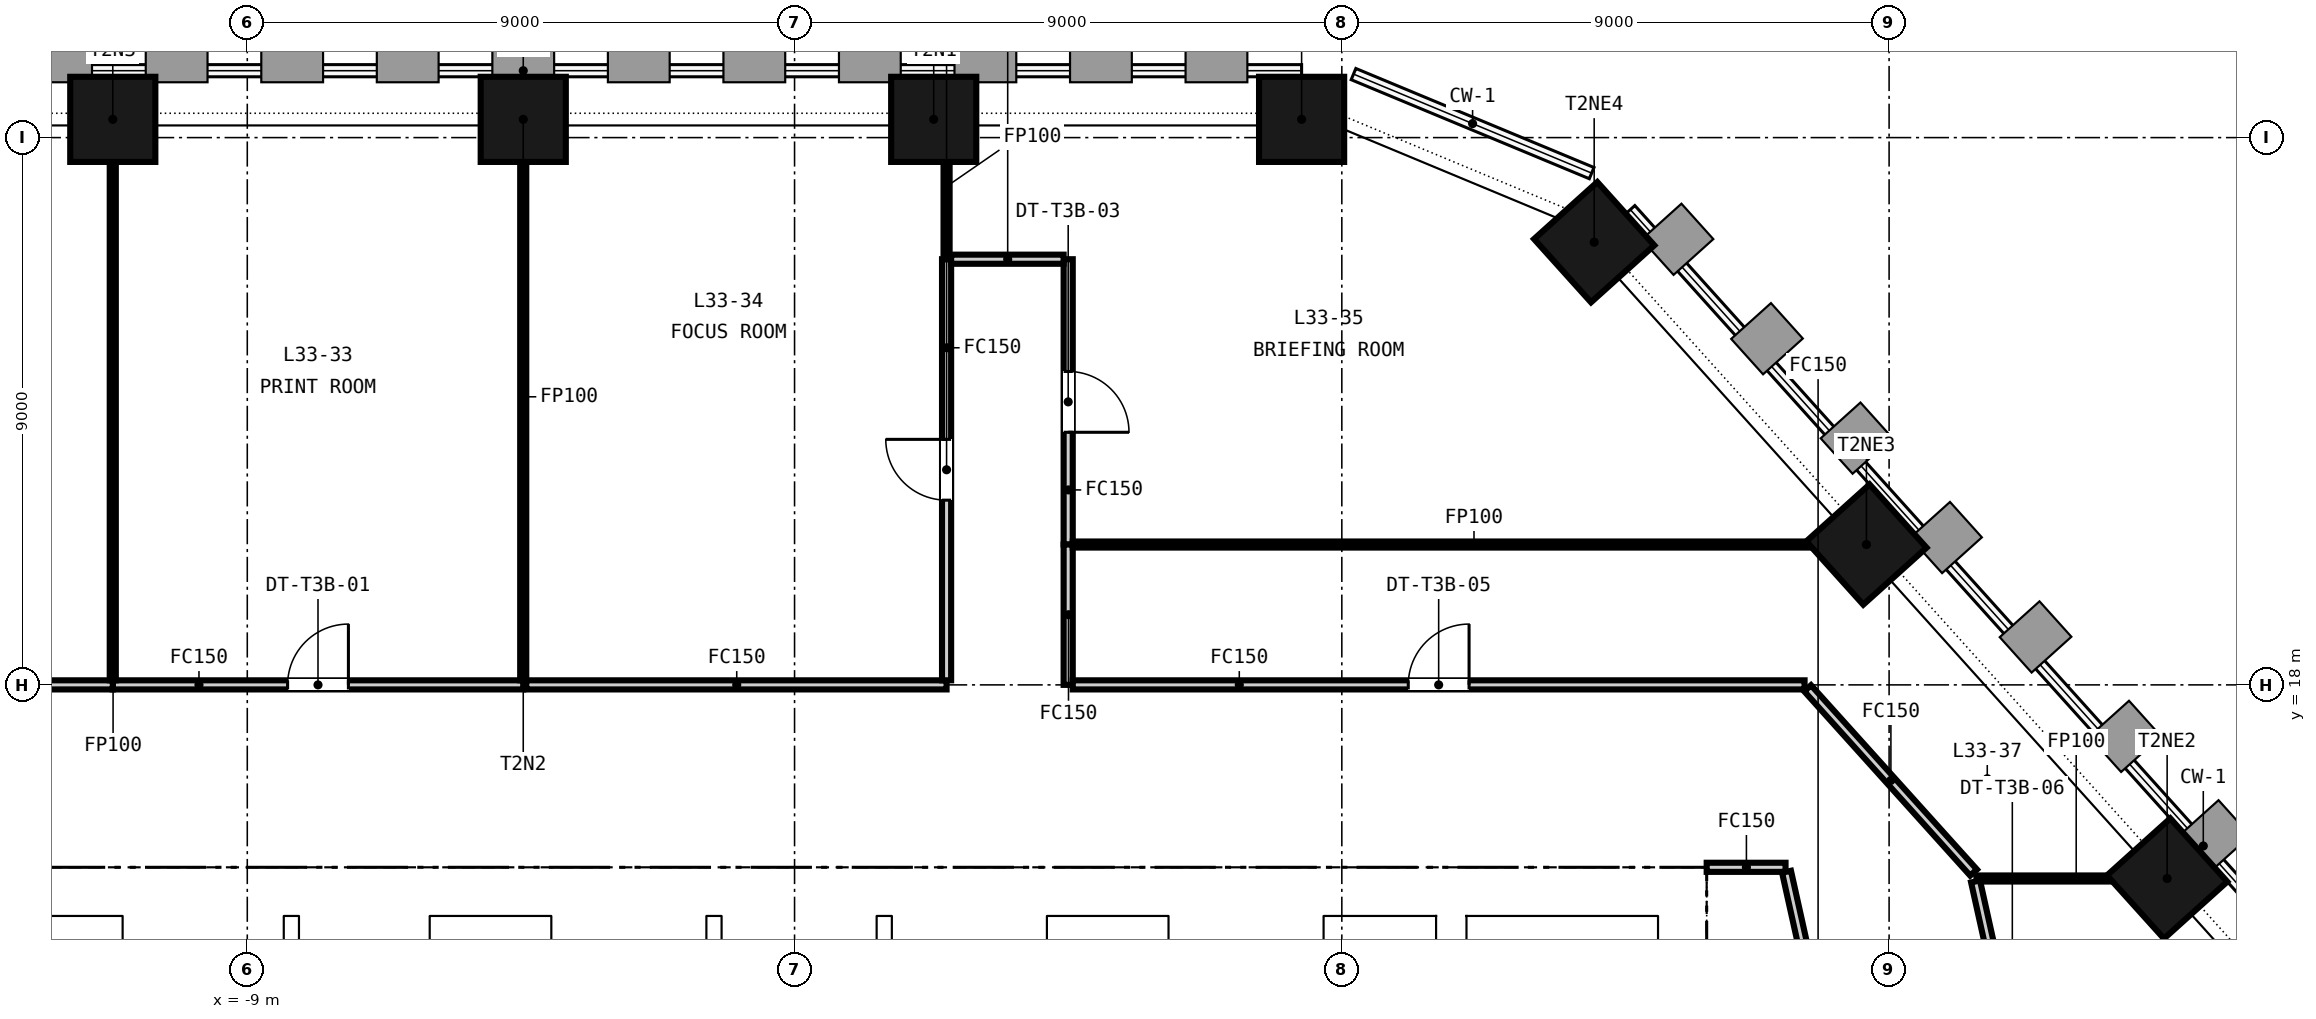
"""IFC4 building model, lengths in metres.
Left out: names, types, materials, properties, quantities, classifications, styles, units other than length and angle.
Written with IfcOpenShell. Run it as: python <this file> out.ifc"""

import sys

from ifc_helpers import new_model, si_unit, direction, frame, frame_2d, origin, origin_2d, place, context, subcontext, project, spatial, rectangle, extrude, element, fill, save


model = new_model("IFC4")
c1 = context("Model", 3, precision=1e-05, world=origin(), true_north=direction((0.0, 1.0)))
c2 = subcontext(c1, "Body", "Model", "MODEL_VIEW")
j1 = project(units=[si_unit("LENGTHUNIT", "METRE"), si_unit("PLANEANGLEUNIT", "RADIAN")], contexts=[c1])
p1 = place(None, origin())
s1 = spatial("IfcSite", under=j1, at=p1, CompositionType="ELEMENT")
p2 = place(p1, origin())
s2 = spatial("IfcBuilding", under=s1, at=p2, CompositionType="ELEMENT")
p3 = place(p2, frame((0.0, 0.0, 137.1)))
s3 = spatial("IfcBuildingStorey", under=s2, at=p3, CompositionType="ELEMENT", Elevation=137.1)
p4 = place(p3, frame((-15.0, 14.6, -0.15), z_axis=(0.0, 0.0, 1.0), x_axis=(1.0, 0.0, 0.0)))
e1 = element("IfcWall", 1, at=p4, inside=s3, PredefinedType="SOLIDWALL", context=c2, shape_type="SweptSolid", body=[
    extrude(rectangle(XDim=30.0, YDim=0.8, at=frame_2d((15.0, 0.0))), origin(), (0.0, 0.0, 1.0), 3.65),
])
p5 = place(p4, frame((9.25, 0.0, 0.15)))
e2 = element("IfcOpeningElement", 2, at=p5, cuts=e1, PredefinedType="OPENING", context=c2, shape_type="SweptSolid", body=[
    extrude(rectangle(XDim=1.5, YDim=2.1, at=frame_2d((0.75, 1.05))), frame((0.0, 0.41, 0.0), z_axis=(0.0, -1.0, 0.0), x_axis=(1.0, 0.0, 0.0)), (0.0, 0.0, 1.0), 0.82),
])
p6 = place(p4, frame((19.4, 0.0, 0.15)))
e3 = element("IfcOpeningElement", 3, at=p6, cuts=e1, PredefinedType="OPENING", context=c2, shape_type="SweptSolid", body=[
    extrude(rectangle(XDim=1.5, YDim=2.1, at=frame_2d((0.75, 1.05))), frame((0.0, 0.41, 0.0), z_axis=(0.0, -1.0, 0.0), x_axis=(1.0, 0.0, 0.0)), (0.0, 0.0, 1.0), 0.82),
])
p7 = place(p4, frame((1.5, 0.0, 0.15)))
e4 = element("IfcOpeningElement", 4, at=p7, cuts=e1, PredefinedType="OPENING", context=c2, shape_type="SweptSolid", body=[
    extrude(rectangle(XDim=1.2, YDim=2.1, at=frame_2d((0.6, 1.05))), frame((0.0, 0.41, 0.0), z_axis=(0.0, -1.0, 0.0), x_axis=(1.0, 0.0, 0.0)), (0.0, 0.0, 1.0), 0.82),
])
p8 = place(p4, frame((27.3, 0.0, 0.15)))
e5 = element("IfcOpeningElement", 5, at=p8, cuts=e1, PredefinedType="OPENING", context=c2, shape_type="SweptSolid", body=[
    extrude(rectangle(XDim=1.2, YDim=2.1, at=frame_2d((0.6, 1.05))), frame((0.0, 0.41, 0.0), z_axis=(0.0, -1.0, 0.0), x_axis=(1.0, 0.0, 0.0)), (0.0, 0.0, 1.0), 0.82),
])
p9 = place(p3, frame((14.6, 0.8, -0.15), z_axis=(0.0, 0.0, 1.0), x_axis=(0.0, 1.0, 0.0)))
e6 = element("IfcWall", 6, at=p9, inside=s3, PredefinedType="SOLIDWALL", context=c2, shape_type="SweptSolid", body=[
    extrude(rectangle(XDim=13.4, YDim=0.8, at=frame_2d((6.7, 0.0))), origin(), (0.0, 0.0, 1.0), 3.65),
])
for number, where, z_axis, x_axis in (
    (7, (-10.8, 0.8, -0.15), (0.0, 0.0, 1.0), (0.0, 1.0, 0.0)),
    (8, (10.8, 0.8, -0.15), (0.0, 0.0, 1.0), (0.0, 1.0, 0.0)),
):
    element("IfcWall", number, at=place(p3, frame(where, z_axis=z_axis, x_axis=x_axis)), inside=s3, PredefinedType="SOLIDWALL", context=c2, shape_type="SweptSolid", body=[
        extrude(rectangle(XDim=13.4, YDim=0.5, at=frame_2d((6.7, 0.0))), origin(), (0.0, 0.0, 1.0), 3.65),
    ])
for number, where, z_axis, x_axis in (
    (9, (8.339, 27.3, -0.15), (0.0, 0.0, 1.0), (-1.0, 0.0, 0.0)),
    (10, (2.288, 27.3, -0.15), (0.0, 0.0, 1.0), (-1.0, 0.0, 0.0)),
    (11, (-4.462, 27.3, -0.15), (0.0, 0.0, 1.0), (-1.0, 0.0, 0.0)),
    (12, (-11.212, 27.3, -0.15), (0.0, 0.0, 1.0), (-1.0, 0.0, 0.0)),
    (13, (22.573, 14.816, -0.15), (0.0, 0.0, 1.0), (-0.669, 0.743, 0.0)),
    (14, (17.627, 20.308, -0.15), (0.0, 0.0, 1.0), (-0.669, 0.743, 0.0)),
    (15, (13.15, 25.28, -0.15), (0.0, 0.0, 1.0), (-0.669, 0.743, 0.0)),
):
    element("IfcColumn", number, at=place(p3, frame(where, z_axis=z_axis, x_axis=x_axis)), inside=s3, PredefinedType="COLUMN", context=c2, shape_type="SweptSolid", body=[
        extrude(rectangle(XDim=1.4, YDim=1.4, at=origin_2d()), origin(), (0.0, 0.0, 1.0), 3.65),
    ])
for number, where, z_axis, x_axis in (
    (16, (-8.275, 11.3, 0.0), (0.0, 0.0, 1.0), (0.0, 1.0, 0.0)),
    (17, (-5.875, 11.3, 0.0), (0.0, 0.0, 1.0), (0.0, 1.0, 0.0)),
    (18, (-4.125, 11.3, 0.0), (0.0, 0.0, 1.0), (0.0, 1.0, 0.0)),
    (19, (-1.325, 11.3, 0.0), (0.0, 0.0, 1.0), (0.0, 1.0, 0.0)),
    (20, (1.475, 11.3, 0.0), (0.0, 0.0, 1.0), (0.0, 1.0, 0.0)),
    (21, (4.275, 11.3, 0.0), (0.0, 0.0, 1.0), (0.0, 1.0, 0.0)),
    (22, (6.025, 11.3, 0.0), (0.0, 0.0, 1.0), (0.0, 1.0, 0.0)),
    (23, (8.825, 11.3, 0.0), (0.0, 0.0, 1.0), (0.0, 1.0, 0.0)),
):
    element("IfcWall", number, at=place(p3, frame(where, z_axis=z_axis, x_axis=x_axis)), inside=s3, PredefinedType="PARTITIONING", context=c2, shape_type="SweptSolid", body=[
        extrude(rectangle(XDim=2.9, YDim=0.25, at=frame_2d((1.45, 0.0))), origin(), (0.0, 0.0, 1.0), 3.5),
    ])
p10 = place(p3, frame((14.1, 0.8, 0.0), z_axis=(0.0, 0.0, 1.0), x_axis=(0.0, 1.0, 0.0)))
e24 = element("IfcWall", 24, at=p10, inside=s3, PredefinedType="SOLIDWALL", context=c2, shape_type="SweptSolid", body=[
    extrude(rectangle(XDim=13.4, YDim=0.2, at=frame_2d((6.7, 0.0))), origin(), (0.0, 0.0, 1.0), 3.5),
])
p11 = place(p3, frame((4.5, 25.0, 0.0), z_axis=(0.0, 0.0, 1.0), x_axis=(0.0, -1.0, 0.0)))
e25 = element("IfcWall", 25, at=p11, inside=s3, PredefinedType="PARTITIONING", context=c2, shape_type="SweptSolid", body=[
    extrude(rectangle(XDim=4.692, YDim=0.15, at=frame_2d((2.346, 0.0))), origin(), (0.0, 0.0, 1.0), 2.741),
])
p12 = place(p11, frame((1.846, 0.0, 0.0)))
e26 = element("IfcOpeningElement", 26, at=p12, cuts=e25, PredefinedType="OPENING", context=c2, shape_type="SweptSolid", body=[
    extrude(rectangle(XDim=1.0, YDim=2.1, at=frame_2d((0.5, 1.05))), frame((0.0, 0.085, 0.0), z_axis=(0.0, -1.0, 0.0), x_axis=(1.0, 0.0, 0.0)), (0.0, 0.0, 1.0), 0.17),
])
p13 = place(p3, frame((4.5, 20.308, 0.0), z_axis=(0.0, 0.0, 1.0), x_axis=(0.0, -1.0, 0.0)))
e27 = element("IfcWall", 27, at=p13, inside=s3, PredefinedType="PARTITIONING", context=c2, shape_type="SweptSolid", body=[
    extrude(rectangle(XDim=2.308, YDim=0.15, at=frame_2d((1.154, 0.0))), origin(), (0.0, 0.0, 1.0), 2.741),
])
p14 = place(p3, frame((16.297, 15.0, 0.0), z_axis=(0.0, 0.0, 1.0), x_axis=(-1.0, 0.0, 0.0)))
e28 = element("IfcWall", 28, at=p14, inside=s3, PredefinedType="PARTITIONING", context=c2, shape_type="SweptSolid", body=[
    extrude(rectangle(XDim=1.297, YDim=0.15, at=frame_2d((0.648, 0.0))), origin(), (0.0, 0.0, 1.0), 2.741),
])
p15 = place(p3, frame((18.608, 4.6, 0.0), z_axis=(0.0, 0.0, 1.0), x_axis=(-0.21691823958, 0.976189775268, 0.0)))
e29 = element("IfcWall", 29, at=p15, inside=s3, PredefinedType="PARTITIONING", context=c2, shape_type="SweptSolid", body=[
    extrude(rectangle(XDim=10.579, YDim=0.15, at=frame_2d((5.289, 0.0))), origin(), (0.0, 0.0, 1.0), 2.741),
])
p16 = place(p15, frame((4.789, 0.0, 0.0)))
e30 = element("IfcOpeningElement", 30, at=p16, cuts=e29, PredefinedType="OPENING", context=c2, shape_type="SweptSolid", body=[
    extrude(rectangle(XDim=1.0, YDim=2.1, at=frame_2d((0.5, 1.05))), frame((0.0, 0.085, 0.0), z_axis=(0.0, -1.0, 0.0), x_axis=(1.0, 0.0, 0.0)), (0.0, 0.0, 1.0), 0.17),
])
p17 = place(p3, frame((-11.212, 18.0, 0.0), z_axis=(0.0, 0.0, 1.0), x_axis=(1.0, 0.0, 0.0)))
e31 = element("IfcWall", 31, at=p17, inside=s3, PredefinedType="PARTITIONING", context=c2, shape_type="SweptSolid", body=[
    extrude(rectangle(XDim=6.75, YDim=0.15, at=frame_2d((3.375, 0.0))), origin(), (0.0, 0.0, 1.0), 2.741),
])
p18 = place(p17, frame((2.875, 0.0, 0.0)))
e32 = element("IfcOpeningElement", 32, at=p18, cuts=e31, PredefinedType="OPENING", context=c2, shape_type="SweptSolid", body=[
    extrude(rectangle(XDim=1.0, YDim=2.1, at=frame_2d((0.5, 1.05))), frame((0.0, 0.085, 0.0), z_axis=(0.0, -1.0, 0.0), x_axis=(1.0, 0.0, 0.0)), (0.0, 0.0, 1.0), 0.17),
])
p19 = place(p3, frame((-4.462, 18.075, 0.0), z_axis=(0.0, 0.0, 1.0), x_axis=(0.0, 1.0, 0.0)))
e33 = element("IfcWall", 33, at=p19, inside=s3, PredefinedType="PARTITIONING", context=c2, shape_type="SweptSolid", body=[
    extrude(rectangle(XDim=9.325, YDim=0.1, at=frame_2d((4.663, 0.0))), origin(), (0.0, 0.0, 1.0), 2.741),
])
p20 = place(p3, frame((-4.412, 18.0, 0.0), z_axis=(0.0, 0.0, 1.0), x_axis=(1.0, 0.0, 0.0)))
e34 = element("IfcWall", 34, at=p20, inside=s3, PredefinedType="PARTITIONING", context=c2, shape_type="SweptSolid", body=[
    extrude(rectangle(XDim=6.912, YDim=0.15, at=frame_2d((3.456, 0.0))), origin(), (0.0, 0.0, 1.0), 2.741),
])
p21 = place(p3, frame((2.5, 18.075, 0.0), z_axis=(0.0, 0.0, 1.0), x_axis=(0.0, 1.0, 0.0)))
e35 = element("IfcWall", 35, at=p21, inside=s3, PredefinedType="PARTITIONING", context=c2, shape_type="SweptSolid", body=[
    extrude(rectangle(XDim=6.925, YDim=0.15, at=frame_2d((3.462, 0.0))), origin(), (0.0, 0.0, 1.0), 2.741),
])
p22 = place(p21, frame((2.962, 0.0, 0.0)))
e36 = element("IfcOpeningElement", 36, at=p22, cuts=e35, PredefinedType="OPENING", context=c2, shape_type="SweptSolid", body=[
    extrude(rectangle(XDim=1.0, YDim=2.1, at=frame_2d((0.5, 1.05))), frame((0.0, 0.085, 0.0), z_axis=(0.0, -1.0, 0.0), x_axis=(1.0, 0.0, 0.0)), (0.0, 0.0, 1.0), 0.17),
])
p23 = place(p3, frame((2.5, 25.0, 0.0), z_axis=(0.0, 0.0, 1.0), x_axis=(0.0, 1.0, 0.0)))
e37 = element("IfcWall", 37, at=p23, inside=s3, PredefinedType="PARTITIONING", context=c2, shape_type="SweptSolid", body=[
    extrude(rectangle(XDim=2.4, YDim=0.1, at=frame_2d((1.2, 0.0))), origin(), (0.0, 0.0, 1.0), 2.741),
])
p24 = place(p3, frame((2.575, 25.0, 0.0), z_axis=(0.0, 0.0, 1.0), x_axis=(1.0, 0.0, 0.0)))
e38 = element("IfcWall", 38, at=p24, inside=s3, PredefinedType="PARTITIONING", context=c2, shape_type="SweptSolid", body=[
    extrude(rectangle(XDim=1.85, YDim=0.15, at=frame_2d((0.925, 0.0))), origin(), (0.0, 0.0, 1.0), 2.741),
])
p25 = place(p3, frame((4.575, 20.308, 0.0), z_axis=(0.0, 0.0, 1.0), x_axis=(1.0, 0.0, 0.0)))
e39 = element("IfcWall", 39, at=p25, inside=s3, PredefinedType="PARTITIONING", context=c2, shape_type="SweptSolid", body=[
    extrude(rectangle(XDim=13.187, YDim=0.1, at=frame_2d((6.594, 0.0))), origin(), (0.0, 0.0, 1.0), 2.741),
])
p26 = place(p3, frame((-18.628, 18.0, 0.0), z_axis=(0.0, 0.0, 1.0), x_axis=(1.0, 0.0, 0.0)))
e40 = element("IfcWall", 40, at=p26, inside=s3, PredefinedType="PARTITIONING", context=c2, shape_type="SweptSolid", body=[
    extrude(rectangle(XDim=7.416, YDim=0.15, at=frame_2d((3.708, 0.0))), origin(), (0.0, 0.0, 1.0), 2.741),
])
p27 = place(p26, frame((3.258, 0.0, 0.0)))
e41 = element("IfcOpeningElement", 41, at=p27, cuts=e40, PredefinedType="OPENING", context=c2, shape_type="SweptSolid", body=[
    extrude(rectangle(XDim=0.9, YDim=2.1, at=frame_2d((0.45, 1.05))), frame((0.0, 0.085, 0.0), z_axis=(0.0, -1.0, 0.0), x_axis=(1.0, 0.0, 0.0)), (0.0, 0.0, 1.0), 0.17),
])
p28 = place(p3, frame((-11.212, 18.075, 0.0), z_axis=(0.0, 0.0, 1.0), x_axis=(0.0, 1.0, 0.0)))
e42 = element("IfcWall", 42, at=p28, inside=s3, PredefinedType="PARTITIONING", context=c2, shape_type="SweptSolid", body=[
    extrude(rectangle(XDim=9.325, YDim=0.1, at=frame_2d((4.663, 0.0))), origin(), (0.0, 0.0, 1.0), 2.741),
])
p29 = place(p3, frame((4.575, 18.0, 0.0), z_axis=(0.0, 0.0, 1.0), x_axis=(1.0, 0.0, 0.0)))
e43 = element("IfcWall", 43, at=p29, inside=s3, PredefinedType="PARTITIONING", context=c2, shape_type="SweptSolid", body=[
    extrude(rectangle(XDim=12.035, YDim=0.15, at=frame_2d((6.018, 0.0))), origin(), (0.0, 0.0, 1.0), 2.741),
])
p30 = place(p29, frame((5.518, 0.0, 0.0)))
e44 = element("IfcOpeningElement", 44, at=p30, cuts=e43, PredefinedType="OPENING", context=c2, shape_type="SweptSolid", body=[
    extrude(rectangle(XDim=1.0, YDim=2.1, at=frame_2d((0.5, 1.05))), frame((0.0, 0.085, 0.0), z_axis=(0.0, -1.0, 0.0), x_axis=(1.0, 0.0, 0.0)), (0.0, 0.0, 1.0), 0.17),
])
p31 = place(p3, frame((16.66, 17.944, 0.0), z_axis=(0.0, 0.0, 1.0), x_axis=(0.669169786575, -0.743109545582, 0.0)))
e45 = element("IfcWall", 45, at=p31, inside=s3, PredefinedType="PARTITIONING", context=c2, shape_type="SweptSolid", body=[
    extrude(rectangle(XDim=4.078, YDim=0.15, at=frame_2d((2.039, 0.0))), origin(), (0.0, 0.0, 1.0), 2.741),
])
p32 = place(p3, frame((19.437, 14.816, 0.0), z_axis=(0.0, 0.0, 1.0), x_axis=(1.0, 0.0, 0.0)))
e46 = element("IfcWall", 46, at=p32, inside=s3, PredefinedType="PARTITIONING", context=c2, shape_type="SweptSolid", body=[
    extrude(rectangle(XDim=3.271, YDim=0.1, at=frame_2d((1.635, 0.0))), origin(), (0.0, 0.0, 1.0), 2.741),
])
p33 = place(p3, frame((19.422, 14.767, 0.0), z_axis=(0.0, 0.0, 1.0), x_axis=(0.216833114764, -0.976208686881, 0.0)))
e47 = element("IfcWall", 47, at=p33, inside=s3, PredefinedType="PARTITIONING", context=c2, shape_type="SweptSolid", body=[
    extrude(rectangle(XDim=5.577, YDim=0.15, at=frame_2d((2.788, 0.0))), origin(), (0.0, 0.0, 1.0), 2.741),
])
p34 = place(p33, frame((2.288, 0.0, 0.0)))
e48 = element("IfcOpeningElement", 48, at=p34, cuts=e47, PredefinedType="OPENING", context=c2, shape_type="SweptSolid", body=[
    extrude(rectangle(XDim=1.0, YDim=2.1, at=frame_2d((0.5, 1.05))), frame((0.0, 0.085, 0.0), z_axis=(0.0, -1.0, 0.0), x_axis=(1.0, 0.0, 0.0)), (0.0, 0.0, 1.0), 0.17),
])
p35 = place(p5, origin())
e49 = element("IfcDoor", 49, at=p35, inside=s3, OperationType="DOUBLE_DOOR_SINGLE_SWING", PredefinedType="DOOR", context=c2, shape_type="SweptSolid", body=[
    extrude(rectangle(XDim=1.5, YDim=2.1, at=frame_2d((0.75, 1.05))), frame((0.0, 0.025, 0.0), z_axis=(0.0, -1.0, 0.0), x_axis=(1.0, 0.0, 0.0)), (0.0, 0.0, 1.0), 0.05),
])
fill(e2, e49)
p36 = place(p6, origin())
e50 = element("IfcDoor", 50, at=p36, inside=s3, OperationType="DOUBLE_DOOR_SINGLE_SWING", PredefinedType="DOOR", context=c2, shape_type="SweptSolid", body=[
    extrude(rectangle(XDim=1.5, YDim=2.1, at=frame_2d((0.75, 1.05))), frame((0.0, 0.025, 0.0), z_axis=(0.0, -1.0, 0.0), x_axis=(1.0, 0.0, 0.0)), (0.0, 0.0, 1.0), 0.05),
])
fill(e3, e50)
p37 = place(p8, origin())
e51 = element("IfcDoor", 51, at=p37, inside=s3, OperationType="SINGLE_SWING_LEFT", PredefinedType="DOOR", context=c2, shape_type="SweptSolid", body=[
    extrude(rectangle(XDim=1.2, YDim=2.1, at=frame_2d((0.6, 1.05))), frame((0.0, 0.025, 0.0), z_axis=(0.0, -1.0, 0.0), x_axis=(1.0, 0.0, 0.0)), (0.0, 0.0, 1.0), 0.05),
])
fill(e5, e51)
p38 = place(p18, origin())
e52 = element("IfcDoor", 52, at=p38, inside=s3, OperationType="SINGLE_SWING_RIGHT", PredefinedType="DOOR", context=c2, shape_type="SweptSolid", body=[
    extrude(rectangle(XDim=1.0, YDim=2.1, at=frame_2d((0.5, 1.05))), frame((0.0, 0.025, 0.0), z_axis=(0.0, -1.0, 0.0), x_axis=(1.0, 0.0, 0.0)), (0.0, 0.0, 1.0), 0.05),
])
fill(e32, e52)
p39 = place(p22, origin())
e53 = element("IfcDoor", 53, at=p39, inside=s3, OperationType="SINGLE_SWING_RIGHT", PredefinedType="DOOR", context=c2, shape_type="SweptSolid", body=[
    extrude(rectangle(XDim=1.0, YDim=2.1, at=frame_2d((0.5, 1.05))), frame((0.0, 0.025, 0.0), z_axis=(0.0, -1.0, 0.0), x_axis=(1.0, 0.0, 0.0)), (0.0, 0.0, 1.0), 0.05),
])
fill(e36, e53)
p40 = place(p12, origin())
e54 = element("IfcDoor", 54, at=p40, inside=s3, OperationType="SINGLE_SWING_RIGHT", PredefinedType="DOOR", context=c2, shape_type="SweptSolid", body=[
    extrude(rectangle(XDim=1.0, YDim=2.1, at=frame_2d((0.5, 1.05))), frame((0.0, 0.025, 0.0), z_axis=(0.0, -1.0, 0.0), x_axis=(1.0, 0.0, 0.0)), (0.0, 0.0, 1.0), 0.05),
])
fill(e26, e54)
p41 = place(p30, origin())
e55 = element("IfcDoor", 55, at=p41, inside=s3, OperationType="SINGLE_SWING_RIGHT", PredefinedType="DOOR", context=c2, shape_type="SweptSolid", body=[
    extrude(rectangle(XDim=1.0, YDim=2.1, at=frame_2d((0.5, 1.05))), frame((0.0, 0.025, 0.0), z_axis=(0.0, -1.0, 0.0), x_axis=(1.0, 0.0, 0.0)), (0.0, 0.0, 1.0), 0.05),
])
fill(e44, e55)
save(model, sys.argv[1])
